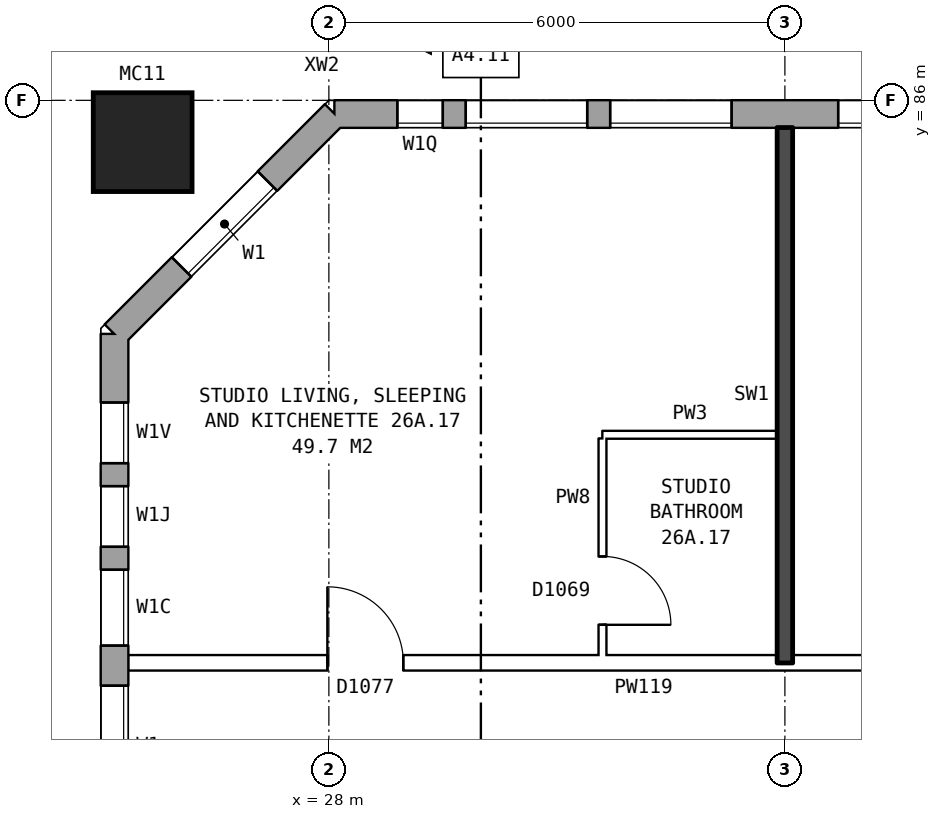
"""IFC4 building model, lengths in metres.
Left out: names, types, materials, properties, quantities, classifications, styles, units other than length and angle.
Written with IfcOpenShell. Run it as: python <this file> out.ifc"""

import sys

from ifc_helpers import new_model, si_unit, direction, frame, frame_2d, origin, origin_2d, place, context, subcontext, project, spatial, rectangle, hollow_rectangle, extrude, element, fill, save


model = new_model("IFC4")
c1 = context("Model", 3, precision=1e-05, world=origin(), true_north=direction((0.0, 1.0)))
c2 = subcontext(c1, "Body", "Model", "MODEL_VIEW")
j1 = project(units=[si_unit("LENGTHUNIT", "METRE"), si_unit("PLANEANGLEUNIT", "RADIAN")], contexts=[c1])
p1 = place(None, origin())
s1 = spatial("IfcSite", under=j1, at=p1, CompositionType="ELEMENT")
p2 = place(p1, origin())
s2 = spatial("IfcBuilding", under=s1, at=p2, CompositionType="ELEMENT")
p3 = place(p2, frame((0.0, 0.0, 96.4)))
s3 = spatial("IfcBuildingStorey", under=s2, at=p3, CompositionType="ELEMENT", Elevation=96.4)
p4 = place(p3, frame((25.55, 85.45, 0.0), z_axis=(0.0, 0.0, 1.0), x_axis=(1.0, 0.0, 0.0)))
e1 = element("IfcColumn", 1, at=p4, inside=s3, PredefinedType="COLUMN", context=c2, shape_type="SweptSolid", body=[
    extrude(hollow_rectangle(XDim=1.3, YDim=1.3, WallThickness=0.07, at=origin_2d()), origin(), (0.0, 0.0, 1.0), 3.1),
])
p5 = place(p3, frame((72.925, 85.82, 0.0), z_axis=(0.0, 0.0, 1.0), x_axis=(-1.0, 0.0, 0.0)))
e2 = element("IfcWall", 2, at=p5, inside=s3, PredefinedType="STANDARD", context=c2, shape_type="SweptSolid", body=[
    extrude(rectangle(XDim=44.851, YDim=0.36, at=frame_2d((22.425, 0.0))), origin(), (0.0, 0.0, 1.0), 2.85),
])
p6 = place(p5, frame((0.4, 0.0, 0.8)))
e3 = element("IfcOpeningElement", 3, at=p6, cuts=e2, PredefinedType="OPENING", context=c2, shape_type="SweptSolid", body=[
    extrude(rectangle(XDim=1.0, YDim=0.9, at=frame_2d((0.5, 0.45))), frame((0.0, 0.19, 0.0), z_axis=(0.0, -1.0, 0.0), x_axis=(1.0, 0.0, 0.0)), (0.0, 0.0, 1.0), 0.38),
])
p7 = place(p5, frame((3.625, 0.0, 0.8)))
e4 = element("IfcOpeningElement", 4, at=p7, cuts=e2, PredefinedType="OPENING", context=c2, shape_type="SweptSolid", body=[
    extrude(rectangle(XDim=1.6, YDim=1.8, at=frame_2d((0.8, 0.9))), frame((0.0, 0.19, 0.0), z_axis=(0.0, -1.0, 0.0), x_axis=(1.0, 0.0, 0.0)), (0.0, 0.0, 1.0), 0.38),
])
p8 = place(p5, frame((6.625, 0.0, 0.8)))
e5 = element("IfcOpeningElement", 5, at=p8, cuts=e2, PredefinedType="OPENING", context=c2, shape_type="SweptSolid", body=[
    extrude(rectangle(XDim=1.6, YDim=1.8, at=frame_2d((0.8, 0.9))), frame((0.0, 0.19, 0.0), z_axis=(0.0, -1.0, 0.0), x_axis=(1.0, 0.0, 0.0)), (0.0, 0.0, 1.0), 0.38),
])
p9 = place(p5, frame((9.625, 0.0, 0.8)))
e6 = element("IfcOpeningElement", 6, at=p9, cuts=e2, PredefinedType="OPENING", context=c2, shape_type="SweptSolid", body=[
    extrude(rectangle(XDim=1.6, YDim=1.8, at=frame_2d((0.8, 0.9))), frame((0.0, 0.19, 0.0), z_axis=(0.0, -1.0, 0.0), x_axis=(1.0, 0.0, 0.0)), (0.0, 0.0, 1.0), 0.38),
])
p10 = place(p5, frame((12.625, 0.0, 0.8)))
e7 = element("IfcOpeningElement", 7, at=p10, cuts=e2, PredefinedType="OPENING", context=c2, shape_type="SweptSolid", body=[
    extrude(rectangle(XDim=1.6, YDim=1.8, at=frame_2d((0.8, 0.9))), frame((0.0, 0.19, 0.0), z_axis=(0.0, -1.0, 0.0), x_axis=(1.0, 0.0, 0.0)), (0.0, 0.0, 1.0), 0.38),
])
p11 = place(p5, frame((15.625, 0.0, 0.8)))
e8 = element("IfcOpeningElement", 8, at=p11, cuts=e2, PredefinedType="OPENING", context=c2, shape_type="SweptSolid", body=[
    extrude(rectangle(XDim=1.6, YDim=1.8, at=frame_2d((0.8, 0.9))), frame((0.0, 0.19, 0.0), z_axis=(0.0, -1.0, 0.0), x_axis=(1.0, 0.0, 0.0)), (0.0, 0.0, 1.0), 0.38),
])
p12 = place(p5, frame((18.625, 0.0, 0.8)))
e9 = element("IfcOpeningElement", 9, at=p12, cuts=e2, PredefinedType="OPENING", context=c2, shape_type="SweptSolid", body=[
    extrude(rectangle(XDim=1.6, YDim=1.8, at=frame_2d((0.8, 0.9))), frame((0.0, 0.19, 0.0), z_axis=(0.0, -1.0, 0.0), x_axis=(1.0, 0.0, 0.0)), (0.0, 0.0, 1.0), 0.38),
])
p13 = place(p5, frame((21.625, 0.0, 0.8)))
e10 = element("IfcOpeningElement", 10, at=p13, cuts=e2, PredefinedType="OPENING", context=c2, shape_type="SweptSolid", body=[
    extrude(rectangle(XDim=1.6, YDim=1.8, at=frame_2d((0.8, 0.9))), frame((0.0, 0.19, 0.0), z_axis=(0.0, -1.0, 0.0), x_axis=(1.0, 0.0, 0.0)), (0.0, 0.0, 1.0), 0.38),
])
p14 = place(p5, frame((24.625, 0.0, 0.8)))
e11 = element("IfcOpeningElement", 11, at=p14, cuts=e2, PredefinedType="OPENING", context=c2, shape_type="SweptSolid", body=[
    extrude(rectangle(XDim=1.6, YDim=1.8, at=frame_2d((0.8, 0.9))), frame((0.0, 0.19, 0.0), z_axis=(0.0, -1.0, 0.0), x_axis=(1.0, 0.0, 0.0)), (0.0, 0.0, 1.0), 0.38),
])
p15 = place(p5, frame((27.625, 0.0, 0.8)))
e12 = element("IfcOpeningElement", 12, at=p15, cuts=e2, PredefinedType="OPENING", context=c2, shape_type="SweptSolid", body=[
    extrude(rectangle(XDim=1.6, YDim=1.8, at=frame_2d((0.8, 0.9))), frame((0.0, 0.19, 0.0), z_axis=(0.0, -1.0, 0.0), x_axis=(1.0, 0.0, 0.0)), (0.0, 0.0, 1.0), 0.38),
])
p16 = place(p5, frame((30.625, 0.0, 0.8)))
e13 = element("IfcOpeningElement", 13, at=p16, cuts=e2, PredefinedType="OPENING", context=c2, shape_type="SweptSolid", body=[
    extrude(rectangle(XDim=1.6, YDim=1.8, at=frame_2d((0.8, 0.9))), frame((0.0, 0.19, 0.0), z_axis=(0.0, -1.0, 0.0), x_axis=(1.0, 0.0, 0.0)), (0.0, 0.0, 1.0), 0.38),
])
p17 = place(p5, frame((33.625, 0.0, 0.8)))
e14 = element("IfcOpeningElement", 14, at=p17, cuts=e2, PredefinedType="OPENING", context=c2, shape_type="SweptSolid", body=[
    extrude(rectangle(XDim=1.6, YDim=1.8, at=frame_2d((0.8, 0.9))), frame((0.0, 0.19, 0.0), z_axis=(0.0, -1.0, 0.0), x_axis=(1.0, 0.0, 0.0)), (0.0, 0.0, 1.0), 0.38),
])
p18 = place(p5, frame((36.625, 0.0, 0.8)))
e15 = element("IfcOpeningElement", 15, at=p18, cuts=e2, PredefinedType="OPENING", context=c2, shape_type="SweptSolid", body=[
    extrude(rectangle(XDim=1.6, YDim=1.8, at=frame_2d((0.8, 0.9))), frame((0.0, 0.19, 0.0), z_axis=(0.0, -1.0, 0.0), x_axis=(1.0, 0.0, 0.0)), (0.0, 0.0, 1.0), 0.38),
])
p19 = place(p5, frame((39.625, 0.0, 0.8)))
e16 = element("IfcOpeningElement", 16, at=p19, cuts=e2, PredefinedType="OPENING", context=c2, shape_type="SweptSolid", body=[
    extrude(rectangle(XDim=1.6, YDim=1.8, at=frame_2d((0.8, 0.9))), frame((0.0, 0.19, 0.0), z_axis=(0.0, -1.0, 0.0), x_axis=(1.0, 0.0, 0.0)), (0.0, 0.0, 1.0), 0.38),
])
p20 = place(p5, frame((41.525, 0.0, 0.8)))
e17 = element("IfcOpeningElement", 17, at=p20, cuts=e2, PredefinedType="OPENING", context=c2, shape_type="SweptSolid", body=[
    extrude(rectangle(XDim=1.6, YDim=1.8, at=frame_2d((0.8, 0.9))), frame((0.0, 0.19, 0.0), z_axis=(0.0, -1.0, 0.0), x_axis=(1.0, 0.0, 0.0)), (0.0, 0.0, 1.0), 0.38),
])
p21 = place(p5, frame((1.7, 0.0, 0.8)))
e18 = element("IfcOpeningElement", 18, at=p21, cuts=e2, PredefinedType="OPENING", context=c2, shape_type="SweptSolid", body=[
    extrude(rectangle(XDim=1.0, YDim=1.8, at=frame_2d((0.5, 0.9))), frame((0.0, 0.19, 0.0), z_axis=(0.0, -1.0, 0.0), x_axis=(1.0, 0.0, 0.0)), (0.0, 0.0, 1.0), 0.38),
])
p22 = place(p5, frame((43.425, 0.0, 0.8)))
e19 = element("IfcOpeningElement", 19, at=p22, cuts=e2, PredefinedType="OPENING", context=c2, shape_type="SweptSolid", body=[
    extrude(rectangle(XDim=0.6, YDim=1.2, at=frame_2d((0.3, 0.6))), frame((0.0, 0.19, 0.0), z_axis=(0.0, -1.0, 0.0), x_axis=(1.0, 0.0, 0.0)), (0.0, 0.0, 1.0), 0.38),
])
p23 = place(p3, frame((28.075, 85.82, 0.0), z_axis=(0.0, 0.0, 1.0), x_axis=(-0.707106781187, -0.707106781187, 0.0)))
e20 = element("IfcWall", 20, at=p23, inside=s3, PredefinedType="STANDARD", context=c2, shape_type="SweptSolid", body=[
    extrude(rectangle(XDim=4.094, YDim=0.36, at=frame_2d((2.047, 0.0))), origin(), (0.0, 0.0, 1.0), 2.85),
])
p24 = place(p23, frame((1.247, 0.0, 0.8)))
e21 = element("IfcOpeningElement", 21, at=p24, cuts=e20, PredefinedType="OPENING", context=c2, shape_type="SweptSolid", body=[
    extrude(rectangle(XDim=1.6, YDim=1.8, at=frame_2d((0.8, 0.9))), frame((0.0, 0.19, 0.0), z_axis=(0.0, -1.0, 0.0), x_axis=(1.0, 0.0, 0.0)), (0.0, 0.0, 1.0), 0.38),
])
p25 = place(p3, frame((25.18, 82.925, 0.0), z_axis=(0.0, 0.0, 1.0), x_axis=(0.0, -1.0, 0.0)))
e22 = element("IfcWall", 22, at=p25, inside=s3, PredefinedType="STANDARD", context=c2, shape_type="SweptSolid", body=[
    extrude(rectangle(XDim=25.851, YDim=0.36, at=frame_2d((12.925, 0.0))), origin(), (0.0, 0.0, 1.0), 2.85),
])
p26 = place(p25, frame((0.9, 0.0, 0.8)))
e23 = element("IfcOpeningElement", 23, at=p26, cuts=e22, PredefinedType="OPENING", context=c2, shape_type="SweptSolid", body=[
    extrude(rectangle(XDim=0.8, YDim=0.9, at=frame_2d((0.4, 0.45))), frame((0.0, 0.19, 0.0), z_axis=(0.0, -1.0, 0.0), x_axis=(1.0, 0.0, 0.0)), (0.0, 0.0, 1.0), 0.38),
])
p27 = place(p25, frame((4.625, 0.0, 0.8)))
e24 = element("IfcOpeningElement", 24, at=p27, cuts=e22, PredefinedType="OPENING", context=c2, shape_type="SweptSolid", body=[
    extrude(rectangle(XDim=1.6, YDim=1.8, at=frame_2d((0.8, 0.9))), frame((0.0, 0.19, 0.0), z_axis=(0.0, -1.0, 0.0), x_axis=(1.0, 0.0, 0.0)), (0.0, 0.0, 1.0), 0.38),
])
p28 = place(p25, frame((7.625, 0.0, 0.8)))
e25 = element("IfcOpeningElement", 25, at=p28, cuts=e22, PredefinedType="OPENING", context=c2, shape_type="SweptSolid", body=[
    extrude(rectangle(XDim=1.6, YDim=1.8, at=frame_2d((0.8, 0.9))), frame((0.0, 0.19, 0.0), z_axis=(0.0, -1.0, 0.0), x_axis=(1.0, 0.0, 0.0)), (0.0, 0.0, 1.0), 0.38),
])
p29 = place(p25, frame((10.625, 0.0, 0.8)))
e26 = element("IfcOpeningElement", 26, at=p29, cuts=e22, PredefinedType="OPENING", context=c2, shape_type="SweptSolid", body=[
    extrude(rectangle(XDim=1.6, YDim=1.8, at=frame_2d((0.8, 0.9))), frame((0.0, 0.19, 0.0), z_axis=(0.0, -1.0, 0.0), x_axis=(1.0, 0.0, 0.0)), (0.0, 0.0, 1.0), 0.38),
])
p30 = place(p25, frame((13.625, 0.0, 0.8)))
e27 = element("IfcOpeningElement", 27, at=p30, cuts=e22, PredefinedType="OPENING", context=c2, shape_type="SweptSolid", body=[
    extrude(rectangle(XDim=1.6, YDim=1.8, at=frame_2d((0.8, 0.9))), frame((0.0, 0.19, 0.0), z_axis=(0.0, -1.0, 0.0), x_axis=(1.0, 0.0, 0.0)), (0.0, 0.0, 1.0), 0.38),
])
p31 = place(p25, frame((16.625, 0.0, 0.8)))
e28 = element("IfcOpeningElement", 28, at=p31, cuts=e22, PredefinedType="OPENING", context=c2, shape_type="SweptSolid", body=[
    extrude(rectangle(XDim=1.6, YDim=1.8, at=frame_2d((0.8, 0.9))), frame((0.0, 0.19, 0.0), z_axis=(0.0, -1.0, 0.0), x_axis=(1.0, 0.0, 0.0)), (0.0, 0.0, 1.0), 0.38),
])
p32 = place(p25, frame((19.625, 0.0, 0.8)))
e29 = element("IfcOpeningElement", 29, at=p32, cuts=e22, PredefinedType="OPENING", context=c2, shape_type="SweptSolid", body=[
    extrude(rectangle(XDim=1.6, YDim=1.8, at=frame_2d((0.8, 0.9))), frame((0.0, 0.19, 0.0), z_axis=(0.0, -1.0, 0.0), x_axis=(1.0, 0.0, 0.0)), (0.0, 0.0, 1.0), 0.38),
])
p33 = place(p25, frame((21.725, 0.0, 0.8)))
e30 = element("IfcOpeningElement", 30, at=p33, cuts=e22, PredefinedType="OPENING", context=c2, shape_type="SweptSolid", body=[
    extrude(rectangle(XDim=1.4, YDim=1.8, at=frame_2d((0.7, 0.9))), frame((0.0, 0.19, 0.0), z_axis=(0.0, -1.0, 0.0), x_axis=(1.0, 0.0, 0.0)), (0.0, 0.0, 1.0), 0.38),
])
p34 = place(p25, frame((2.0, 0.0, 0.8)))
e31 = element("IfcOpeningElement", 31, at=p34, cuts=e22, PredefinedType="OPENING", context=c2, shape_type="SweptSolid", body=[
    extrude(rectangle(XDim=0.8, YDim=1.5, at=frame_2d((0.4, 0.75))), frame((0.0, 0.19, 0.0), z_axis=(0.0, -1.0, 0.0), x_axis=(1.0, 0.0, 0.0)), (0.0, 0.0, 1.0), 0.38),
])
p35 = place(p25, frame((3.1, 0.0, 0.8)))
e32 = element("IfcOpeningElement", 32, at=p35, cuts=e22, PredefinedType="OPENING", context=c2, shape_type="SweptSolid", body=[
    extrude(rectangle(XDim=1.0, YDim=1.8, at=frame_2d((0.5, 0.9))), frame((0.0, 0.19, 0.0), z_axis=(0.0, -1.0, 0.0), x_axis=(1.0, 0.0, 0.0)), (0.0, 0.0, 1.0), 0.38),
])
p36 = place(p25, frame((23.425, 0.0, 0.8)))
e33 = element("IfcOpeningElement", 33, at=p36, cuts=e22, PredefinedType="OPENING", context=c2, shape_type="SweptSolid", body=[
    extrude(rectangle(XDim=1.0, YDim=1.2, at=frame_2d((0.5, 0.6))), frame((0.0, 0.19, 0.0), z_axis=(0.0, -1.0, 0.0), x_axis=(1.0, 0.0, 0.0)), (0.0, 0.0, 1.0), 0.38),
])
p37 = place(p3, frame((25.36, 78.6, 0.0), z_axis=(0.0, 0.0, 1.0), x_axis=(1.0, 0.0, 0.0)))
e34 = element("IfcWall", 34, at=p37, inside=s3, PredefinedType="PARTITIONING", context=c2, shape_type="SweptSolid", body=[
    extrude(rectangle(XDim=20.54, YDim=0.2, at=frame_2d((10.27, 0.0))), origin(), (0.0, 0.0, 1.0), 2.85),
])
p38 = place(p37, frame((15.94, 0.0, 0.0)))
e35 = element("IfcOpeningElement", 35, at=p38, cuts=e34, PredefinedType="OPENING", context=c2, shape_type="SweptSolid", body=[
    extrude(rectangle(XDim=1.0, YDim=2.1, at=frame_2d((0.5, 1.05))), frame((0.0, 0.11, 0.0), z_axis=(0.0, -1.0, 0.0), x_axis=(1.0, 0.0, 0.0)), (0.0, 0.0, 1.0), 0.22),
])
p39 = place(p37, frame((9.94, 0.0, 0.0)))
e36 = element("IfcOpeningElement", 36, at=p39, cuts=e34, PredefinedType="OPENING", context=c2, shape_type="SweptSolid", body=[
    extrude(rectangle(XDim=1.0, YDim=2.1, at=frame_2d((0.5, 1.05))), frame((0.0, 0.11, 0.0), z_axis=(0.0, -1.0, 0.0), x_axis=(1.0, 0.0, 0.0)), (0.0, 0.0, 1.0), 0.22),
])
p40 = place(p37, frame((2.62, 0.0, 0.0)))
e37 = element("IfcOpeningElement", 37, at=p40, cuts=e34, PredefinedType="OPENING", context=c2, shape_type="SweptSolid", body=[
    extrude(rectangle(XDim=1.0, YDim=2.1, at=frame_2d((0.5, 1.05))), frame((0.0, 0.11, 0.0), z_axis=(0.0, -1.0, 0.0), x_axis=(1.0, 0.0, 0.0)), (0.0, 0.0, 1.0), 0.22),
])
p41 = place(p3, frame((31.6, 81.6, 0.0), z_axis=(0.0, 0.0, 1.0), x_axis=(1.0, 0.0, 0.0)))
e38 = element("IfcWall", 38, at=p41, inside=s3, PredefinedType="PARTITIONING", context=c2, shape_type="SweptSolid", body=[
    extrude(rectangle(XDim=2.3, YDim=0.1, at=frame_2d((1.15, 0.0))), origin(), (0.0, 0.0, 1.0), 2.85),
])
p42 = place(p3, frame((31.6, 78.7, 0.0), z_axis=(0.0, 0.0, 1.0), x_axis=(0.0, 1.0, 0.0)))
e39 = element("IfcWall", 39, at=p42, inside=s3, PredefinedType="PARTITIONING", context=c2, shape_type="SweptSolid", body=[
    extrude(rectangle(XDim=2.85, YDim=0.1, at=frame_2d((1.425, 0.0))), origin(), (0.0, 0.0, 1.0), 2.85),
])
p43 = place(p42, frame((0.4, 0.0, 0.0)))
e40 = element("IfcOpeningElement", 40, at=p43, cuts=e39, PredefinedType="OPENING", context=c2, shape_type="SweptSolid", body=[
    extrude(rectangle(XDim=0.9, YDim=2.1, at=frame_2d((0.45, 1.05))), frame((0.0, 0.06, 0.0), z_axis=(0.0, -1.0, 0.0), x_axis=(1.0, 0.0, 0.0)), (0.0, 0.0, 1.0), 0.12),
])
p44 = place(p3, frame((34.0, 78.6, 0.0), z_axis=(0.0, 0.0, 1.0), x_axis=(0.0, 1.0, 0.0)))
e41 = element("IfcWall", 41, at=p44, inside=s3, PredefinedType="SOLIDWALL", context=c2, shape_type="SweptSolid", body=[
    extrude(rectangle(XDim=7.04, YDim=0.2, at=frame_2d((3.52, 0.0))), origin(), (0.0, 0.0, 1.0), 2.85),
])
p45 = place(p18, origin())
e42 = element("IfcWindow", 42, at=p45, inside=s3, PartitioningType="SINGLE_PANEL", PredefinedType="WINDOW", context=c2, shape_type="SweptSolid", body=[
    extrude(rectangle(XDim=1.6, YDim=1.8, at=frame_2d((0.8, 0.9))), frame((0.0, 0.15, 0.0), z_axis=(0.0, -1.0, 0.0), x_axis=(1.0, 0.0, 0.0)), (0.0, 0.0, 1.0), 0.06),
])
fill(e15, e42)
p46 = place(p19, origin())
e43 = element("IfcWindow", 43, at=p46, inside=s3, PartitioningType="SINGLE_PANEL", PredefinedType="WINDOW", context=c2, shape_type="SweptSolid", body=[
    extrude(rectangle(XDim=1.6, YDim=1.8, at=frame_2d((0.8, 0.9))), frame((0.0, 0.15, 0.0), z_axis=(0.0, -1.0, 0.0), x_axis=(1.0, 0.0, 0.0)), (0.0, 0.0, 1.0), 0.06),
])
fill(e16, e43)
p47 = place(p20, origin())
e44 = element("IfcWindow", 44, at=p47, inside=s3, PartitioningType="SINGLE_PANEL", PredefinedType="WINDOW", context=c2, shape_type="SweptSolid", body=[
    extrude(rectangle(XDim=1.6, YDim=1.8, at=frame_2d((0.8, 0.9))), frame((0.0, 0.15, 0.0), z_axis=(0.0, -1.0, 0.0), x_axis=(1.0, 0.0, 0.0)), (0.0, 0.0, 1.0), 0.06),
])
fill(e17, e44)
p48 = place(p24, origin())
e45 = element("IfcWindow", 45, at=p48, inside=s3, PartitioningType="SINGLE_PANEL", PredefinedType="WINDOW", context=c2, shape_type="SweptSolid", body=[
    extrude(rectangle(XDim=1.6, YDim=1.8, at=frame_2d((0.8, 0.9))), frame((0.0, 0.15, 0.0), z_axis=(0.0, -1.0, 0.0), x_axis=(1.0, 0.0, 0.0)), (0.0, 0.0, 1.0), 0.06),
])
fill(e21, e45)
p49 = place(p26, origin())
e46 = element("IfcWindow", 46, at=p49, inside=s3, PartitioningType="SINGLE_PANEL", PredefinedType="WINDOW", context=c2, shape_type="SweptSolid", body=[
    extrude(rectangle(XDim=0.8, YDim=0.9, at=frame_2d((0.4, 0.45))), frame((0.0, 0.15, 0.0), z_axis=(0.0, -1.0, 0.0), x_axis=(1.0, 0.0, 0.0)), (0.0, 0.0, 1.0), 0.06),
])
fill(e23, e46)
p50 = place(p27, origin())
e47 = element("IfcWindow", 47, at=p50, inside=s3, PartitioningType="SINGLE_PANEL", PredefinedType="WINDOW", context=c2, shape_type="SweptSolid", body=[
    extrude(rectangle(XDim=1.6, YDim=1.8, at=frame_2d((0.8, 0.9))), frame((0.0, 0.15, 0.0), z_axis=(0.0, -1.0, 0.0), x_axis=(1.0, 0.0, 0.0)), (0.0, 0.0, 1.0), 0.06),
])
fill(e24, e47)
p51 = place(p40, origin())
e48 = element("IfcDoor", 48, at=p51, inside=s3, OperationType="SINGLE_SWING_LEFT", PredefinedType="DOOR", context=c2, shape_type="SweptSolid", body=[
    extrude(rectangle(XDim=1.0, YDim=2.1, at=frame_2d((0.5, 1.05))), frame((0.0, 0.025, 0.0), z_axis=(0.0, -1.0, 0.0), x_axis=(1.0, 0.0, 0.0)), (0.0, 0.0, 1.0), 0.05),
])
fill(e37, e48)
p52 = place(p43, frame((0.9, 0.0, 0.0), z_axis=(0.0, 0.0, 1.0), x_axis=(-1.0, 0.0, 0.0)))
e49 = element("IfcDoor", 49, at=p52, inside=s3, OperationType="SINGLE_SWING_RIGHT", PredefinedType="DOOR", context=c2, shape_type="SweptSolid", body=[
    extrude(rectangle(XDim=0.9, YDim=2.1, at=frame_2d((0.45, 1.05))), frame((0.0, 0.025, 0.0), z_axis=(0.0, -1.0, 0.0), x_axis=(1.0, 0.0, 0.0)), (0.0, 0.0, 1.0), 0.05),
])
fill(e40, e49)
p53 = place(p22, origin())
e50 = element("IfcWindow", 50, at=p53, inside=s3, PartitioningType="SINGLE_PANEL", PredefinedType="WINDOW", context=c2, shape_type="SweptSolid", body=[
    extrude(rectangle(XDim=0.6, YDim=1.2, at=frame_2d((0.3, 0.6))), frame((0.0, 0.15, 0.0), z_axis=(0.0, -1.0, 0.0), x_axis=(1.0, 0.0, 0.0)), (0.0, 0.0, 1.0), 0.06),
])
fill(e19, e50)
p54 = place(p34, origin())
e51 = element("IfcWindow", 51, at=p54, inside=s3, PartitioningType="SINGLE_PANEL", PredefinedType="WINDOW", context=c2, shape_type="SweptSolid", body=[
    extrude(rectangle(XDim=0.8, YDim=1.5, at=frame_2d((0.4, 0.75))), frame((0.0, 0.15, 0.0), z_axis=(0.0, -1.0, 0.0), x_axis=(1.0, 0.0, 0.0)), (0.0, 0.0, 1.0), 0.06),
])
fill(e31, e51)
p55 = place(p35, origin())
e52 = element("IfcWindow", 52, at=p55, inside=s3, PartitioningType="SINGLE_PANEL", PredefinedType="WINDOW", context=c2, shape_type="SweptSolid", body=[
    extrude(rectangle(XDim=1.0, YDim=1.8, at=frame_2d((0.5, 0.9))), frame((0.0, 0.15, 0.0), z_axis=(0.0, -1.0, 0.0), x_axis=(1.0, 0.0, 0.0)), (0.0, 0.0, 1.0), 0.06),
])
fill(e32, e52)
save(model, sys.argv[1])
